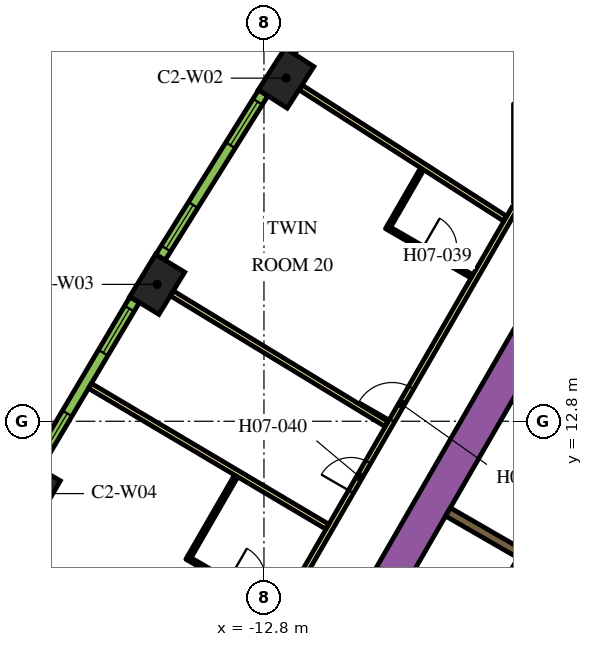
"""IFC4 building model, lengths in metres.
Left out: names, types, materials, properties, quantities, classifications, styles, units other than length and angle.
Written with IfcOpenShell. Run it as: python <this file> out.ifc"""

import sys

from ifc_helpers import new_model, si_unit, direction, frame, frame_2d, origin, origin_2d, place, context, subcontext, project, spatial, rectangle, extrude, element, fill, save


model = new_model("IFC4")
c1 = context("Model", 3, precision=1e-05, world=origin(), true_north=direction((0.0, 1.0)))
c2 = subcontext(c1, "Body", "Model", "MODEL_VIEW")
j1 = project(units=[si_unit("LENGTHUNIT", "METRE"), si_unit("PLANEANGLEUNIT", "RADIAN")], contexts=[c1])
p1 = place(None, origin())
s1 = spatial("IfcSite", under=j1, at=p1, CompositionType="ELEMENT")
p2 = place(p1, origin())
s2 = spatial("IfcBuilding", under=s1, at=p2, CompositionType="ELEMENT")
p3 = place(p2, frame((0.0, 0.0, 103.2)))
s3 = spatial("IfcBuildingStorey", under=s2, at=p3, CompositionType="ELEMENT", Elevation=103.2)
for number, where, z_axis, x_axis in (
    (1, (-12.217, 21.828, 0.0), (0.0, 0.0, 1.0), (-0.54, -0.842, 0.0)),
    (2, (-15.609, 16.402, 0.0), (0.0, 0.0, 1.0), (-0.52, -0.854, 0.0)),
    (3, (-18.874, 10.897, 0.0), (0.0, 0.0, 1.0), (-0.5, -0.866, 0.0)),
):
    element("IfcColumn", number, at=place(p3, frame(where, z_axis=z_axis, x_axis=x_axis)), inside=s3, PredefinedType="COLUMN", context=c2, shape_type="SweptSolid", body=[
        extrude(rectangle(XDim=1.3, YDim=0.9, at=origin_2d()), origin(), (0.0, 0.0, 1.0), 3.9),
    ])
p4 = place(p3, frame((-15.36, -1.503, 0.0), z_axis=(0.0, 0.0, 1.0), x_axis=(0.50000389221, 0.866023156604, 0.0)))
e4 = element("IfcWall", 4, at=p4, inside=s3, PredefinedType="SOLIDWALL", context=c2, shape_type="SweptSolid", body=[
    extrude(rectangle(XDim=21.0, YDim=0.9, at=frame_2d((10.5, 0.0))), origin(), (0.0, 0.0, 1.0), 3.9),
])
p5 = place(p3, frame((-7.959, 10.415, 0.0), z_axis=(0.0, 0.0, 1.0), x_axis=(0.866020958405, -0.500007699544, 0.0)))
e5 = element("IfcWall", 5, at=p5, inside=s3, PredefinedType="SOLIDWALL", context=c2, shape_type="SweptSolid", body=[
    extrude(rectangle(XDim=4.1, YDim=0.25, at=frame_2d((2.05, 0.0))), origin(), (0.0, 0.0, 1.0), 3.9),
])
p6 = place(p3, frame((-6.008, 9.144, 0.0), z_axis=(0.0, 0.0, 1.0), x_axis=(-0.500006956611, -0.866021387346, 0.0)))
e6 = element("IfcWall", 6, at=p6, inside=s3, PredefinedType="SOLIDWALL", context=c2, shape_type="SweptSolid", body=[
    extrude(rectangle(XDim=9.83, YDim=0.25, at=frame_2d((4.915, 0.0))), origin(), (0.0, 0.0, 1.0), 3.9),
])
p7 = place(p6, frame((6.985, 0.0, 0.0)))
e7 = element("IfcOpeningElement", 7, at=p7, cuts=e6, PredefinedType="OPENING", context=c2, shape_type="SweptSolid", body=[
    extrude(rectangle(XDim=0.9, YDim=2.1, at=frame_2d((0.45, 1.05))), frame((0.0, 0.135, 0.0), z_axis=(0.0, -1.0, 0.0), x_axis=(1.0, 0.0, 0.0)), (0.0, 0.0, 1.0), 0.27),
])
p8 = place(p3, frame((-19.081, -3.9, 0.0), z_axis=(0.0, 0.0, 1.0), x_axis=(0.499998313975, 0.866026377209, 0.0)))
e8 = element("IfcWall", 8, at=p8, inside=s3, PredefinedType="PARTITIONING", context=c2, shape_type="SweptSolid", body=[
    extrude(rectangle(XDim=25.766, YDim=0.15, at=frame_2d((12.883, 0.0))), origin(), (0.0, 0.0, 1.0), 2.75),
])
p9 = place(p8, frame((19.306, 0.0, 0.0)))
e9 = element("IfcOpeningElement", 9, at=p9, cuts=e8, PredefinedType="OPENING", context=c2, shape_type="SweptSolid", body=[
    extrude(rectangle(XDim=1.0, YDim=2.1, at=frame_2d((0.5, 1.05))), frame((0.0, 0.085, 0.0), z_axis=(0.0, -1.0, 0.0), x_axis=(1.0, 0.0, 0.0)), (0.0, 0.0, 1.0), 0.17),
])
p10 = place(p8, frame((17.144, 0.0, 0.0)))
e10 = element("IfcOpeningElement", 10, at=p10, cuts=e8, PredefinedType="OPENING", context=c2, shape_type="SweptSolid", body=[
    extrude(rectangle(XDim=0.9, YDim=2.1, at=frame_2d((0.45, 1.05))), frame((0.0, 0.085, 0.0), z_axis=(0.0, -1.0, 0.0), x_axis=(1.0, 0.0, 0.0)), (0.0, 0.0, 1.0), 0.17),
])
p11 = place(p8, frame((9.955, 0.0, 0.0)))
e11 = element("IfcOpeningElement", 11, at=p11, cuts=e8, PredefinedType="OPENING", context=c2, shape_type="SweptSolid", body=[
    extrude(rectangle(XDim=1.1, YDim=2.1, at=frame_2d((0.55, 1.05))), frame((0.0, 0.085, 0.0), z_axis=(0.0, -1.0, 0.0), x_axis=(1.0, 0.0, 0.0)), (0.0, 0.0, 1.0), 0.17),
])
p12 = place(p8, frame((8.648, 0.0, 0.0)))
e12 = element("IfcOpeningElement", 12, at=p12, cuts=e8, PredefinedType="OPENING", context=c2, shape_type="SweptSolid", body=[
    extrude(rectangle(XDim=1.0, YDim=2.1, at=frame_2d((0.5, 1.05))), frame((0.0, 0.085, 0.0), z_axis=(0.0, -1.0, 0.0), x_axis=(1.0, 0.0, 0.0)), (0.0, 0.0, 1.0), 0.17),
])
p13 = place(p8, frame((1.553, 0.0, 0.0)))
e13 = element("IfcOpeningElement", 13, at=p13, cuts=e8, PredefinedType="OPENING", context=c2, shape_type="SweptSolid", body=[
    extrude(rectangle(XDim=0.9, YDim=2.1, at=frame_2d((0.45, 1.05))), frame((0.0, 0.085, 0.0), z_axis=(0.0, -1.0, 0.0), x_axis=(1.0, 0.0, 0.0)), (0.0, 0.0, 1.0), 0.17),
])
p14 = place(p3, frame((-17.379, 13.731, 0.0), z_axis=(0.0, 0.0, 1.0), x_axis=(0.860132461691, -0.510070728768, 0.0)))
e14 = element("IfcWall", 14, at=p14, inside=s3, PredefinedType="PARTITIONING", context=c2, shape_type="SweptSolid", body=[
    extrude(rectangle(XDim=7.257, YDim=0.15, at=frame_2d((3.628, 0.0))), origin(), (0.0, 0.0, 1.0), 2.75),
])
p15 = place(p3, frame((-15.225, 16.167, 0.0), z_axis=(0.0, 0.0, 1.0), x_axis=(0.854088713274, -0.520127359266, 0.0)))
e15 = element("IfcWall", 15, at=p15, inside=s3, PredefinedType="PARTITIONING", context=c2, shape_type="SweptSolid", body=[
    extrude(rectangle(XDim=6.611, YDim=0.15, at=frame_2d((3.305, 0.0))), origin(), (0.0, 0.0, 1.0), 2.75),
])
p16 = place(p3, frame((-11.838, 21.585, 0.0), z_axis=(0.0, 0.0, 1.0), x_axis=(0.841699322813, -0.539946525108, 0.0)))
e16 = element("IfcWall", 16, at=p16, inside=s3, PredefinedType="PARTITIONING", context=c2, shape_type="SweptSolid", body=[
    extrude(rectangle(XDim=6.392, YDim=0.15, at=frame_2d((3.196, 0.0))), origin(), (0.0, 0.0, 1.0), 2.75),
])
p17 = place(p3, frame((-8.326, 26.923, 0.0), z_axis=(0.0, 0.0, 1.0), x_axis=(0.828836601893, -0.5594907393, 0.0)))
e17 = element("IfcWall", 17, at=p17, inside=s3, PredefinedType="PARTITIONING", context=c2, shape_type="SweptSolid", body=[
    extrude(rectangle(XDim=8.909, YDim=0.15, at=frame_2d((4.455, 0.0))), origin(), (0.0, 0.0, 1.0), 2.75),
])
p18 = place(p3, frame((-9.578, 17.911, 0.0), z_axis=(0.0, 0.0, 1.0), x_axis=(0.866021400173, -0.500006934395, 0.0)))
e18 = element("IfcWall", 18, at=p18, inside=s3, PredefinedType="PARTITIONING", context=c2, shape_type="SweptSolid", body=[
    extrude(rectangle(XDim=2.6, YDim=0.1, at=frame_2d((1.3, 0.0))), origin(), (0.0, 0.0, 1.0), 2.75),
])
p19 = place(p18, frame((1.1, 0.0, 0.0)))
e19 = element("IfcOpeningElement", 19, at=p19, cuts=e18, PredefinedType="OPENING", context=c2, shape_type="SweptSolid", body=[
    extrude(rectangle(XDim=0.9, YDim=2.1, at=frame_2d((0.45, 1.05))), frame((0.0, 0.06, 0.0), z_axis=(0.0, -1.0, 0.0), x_axis=(1.0, 0.0, 0.0)), (0.0, 0.0, 1.0), 0.12),
])
p20 = place(p3, frame((-9.51, 17.929, 0.0), z_axis=(0.0, 0.0, 1.0), x_axis=(0.500062521093, 0.865989304205, 0.0)))
e20 = element("IfcWall", 20, at=p20, inside=s3, PredefinedType="PARTITIONING", context=c2, shape_type="SweptSolid", body=[
    extrude(rectangle(XDim=1.74, YDim=0.1, at=frame_2d((0.87, 0.0))), origin(), (0.0, 0.0, 1.0), 2.75),
])
p21 = place(p3, frame((-14.83, 9.213, 0.0), z_axis=(0.0, 0.0, 1.0), x_axis=(0.866034573852, -0.49998411664, 0.0)))
e21 = element("IfcWall", 21, at=p21, inside=s3, PredefinedType="PARTITIONING", context=c2, shape_type="SweptSolid", body=[
    extrude(rectangle(XDim=2.8, YDim=0.1, at=frame_2d((1.4, 0.0))), origin(), (0.0, 0.0, 1.0), 2.75),
])
p22 = place(p21, frame((1.25, 0.0, 0.0)))
e22 = element("IfcOpeningElement", 22, at=p22, cuts=e21, PredefinedType="OPENING", context=c2, shape_type="SweptSolid", body=[
    extrude(rectangle(XDim=1.0, YDim=2.1, at=frame_2d((0.5, 1.05))), frame((0.0, 0.06, 0.0), z_axis=(0.0, -1.0, 0.0), x_axis=(1.0, 0.0, 0.0)), (0.0, 0.0, 1.0), 0.12),
])
p23 = place(p3, frame((-14.762, 9.231, 0.0), z_axis=(0.0, 0.0, 1.0), x_axis=(0.500003092839, 0.866023618125, 0.0)))
e23 = element("IfcWall", 23, at=p23, inside=s3, PredefinedType="PARTITIONING", context=c2, shape_type="SweptSolid", body=[
    extrude(rectangle(XDim=2.46, YDim=0.1, at=frame_2d((1.23, 0.0))), origin(), (0.0, 0.0, 1.0), 2.75),
])
p24 = place(p3, frame((-9.311, 26.799, 0.0), z_axis=(0.0, 0.0, 1.0), x_axis=(-0.549741341923, -0.835334937005, 0.0)))
e24 = element("IfcWall", 24, at=p24, inside=s3, PredefinedType="SOLIDWALL", context=c2, shape_type="SweptSolid", body=[
    extrude(rectangle(XDim=5.1, YDim=0.29, at=frame_2d((2.55, 0.0))), origin(), (0.0, 0.0, 1.0), 3.65),
])
p25 = place(p24, frame((0.273, 0.0, 0.9)))
e25 = element("IfcOpeningElement", 25, at=p25, cuts=e24, PredefinedType="OPENING", context=c2, shape_type="SweptSolid", body=[
    extrude(rectangle(XDim=1.35, YDim=2.15, at=frame_2d((0.675, 1.075))), frame((0.0, 0.155, 0.0), z_axis=(0.0, -1.0, 0.0), x_axis=(1.0, 0.0, 0.0)), (0.0, 0.0, 1.0), 0.31),
])
p26 = place(p24, frame((3.478, 0.0, 0.9)))
e26 = element("IfcOpeningElement", 26, at=p26, cuts=e24, PredefinedType="OPENING", context=c2, shape_type="SweptSolid", body=[
    extrude(rectangle(XDim=1.35, YDim=2.15, at=frame_2d((0.675, 1.075))), frame((0.0, 0.155, 0.0), z_axis=(0.0, -1.0, 0.0), x_axis=(1.0, 0.0, 0.0)), (0.0, 0.0, 1.0), 0.31),
])
p27 = place(p3, frame((-12.82, 21.439, 0.0), z_axis=(0.0, 0.0, 1.0), x_axis=(-0.530072082134, -0.847952585787, 0.0)))
e27 = element("IfcWall", 27, at=p27, inside=s3, PredefinedType="SOLIDWALL", context=c2, shape_type="SweptSolid", body=[
    extrude(rectangle(XDim=5.1, YDim=0.29, at=frame_2d((2.55, 0.0))), origin(), (0.0, 0.0, 1.0), 3.65),
])
p28 = place(p27, frame((0.273, 0.0, 0.9)))
e28 = element("IfcOpeningElement", 28, at=p28, cuts=e27, PredefinedType="OPENING", context=c2, shape_type="SweptSolid", body=[
    extrude(rectangle(XDim=1.35, YDim=2.15, at=frame_2d((0.675, 1.075))), frame((0.0, 0.155, 0.0), z_axis=(0.0, -1.0, 0.0), x_axis=(1.0, 0.0, 0.0)), (0.0, 0.0, 1.0), 0.31),
])
p29 = place(p27, frame((3.478, 0.0, 0.9)))
e29 = element("IfcOpeningElement", 29, at=p29, cuts=e27, PredefinedType="OPENING", context=c2, shape_type="SweptSolid", body=[
    extrude(rectangle(XDim=1.35, YDim=2.15, at=frame_2d((0.675, 1.075))), frame((0.0, 0.155, 0.0), z_axis=(0.0, -1.0, 0.0), x_axis=(1.0, 0.0, 0.0)), (0.0, 0.0, 1.0), 0.31),
])
p30 = place(p3, frame((-16.203, 15.998, 0.0), z_axis=(0.0, 0.0, 1.0), x_axis=(-0.510054281659, -0.860142214847, 0.0)))
e30 = element("IfcWall", 30, at=p30, inside=s3, PredefinedType="SOLIDWALL", context=c2, shape_type="SweptSolid", body=[
    extrude(rectangle(XDim=5.101, YDim=0.29, at=frame_2d((2.55, 0.0))), origin(), (0.0, 0.0, 1.0), 3.65),
])
p31 = place(p30, frame((0.273, 0.0, 0.9)))
e31 = element("IfcOpeningElement", 31, at=p31, cuts=e30, PredefinedType="OPENING", context=c2, shape_type="SweptSolid", body=[
    extrude(rectangle(XDim=1.35, YDim=2.15, at=frame_2d((0.675, 1.075))), frame((0.0, 0.155, 0.0), z_axis=(0.0, -1.0, 0.0), x_axis=(1.0, 0.0, 0.0)), (0.0, 0.0, 1.0), 0.31),
])
p32 = place(p30, frame((3.478, 0.0, 0.9)))
e32 = element("IfcOpeningElement", 32, at=p32, cuts=e30, PredefinedType="OPENING", context=c2, shape_type="SweptSolid", body=[
    extrude(rectangle(XDim=1.35, YDim=2.15, at=frame_2d((0.675, 1.075))), frame((0.0, 0.155, 0.0), z_axis=(0.0, -1.0, 0.0), x_axis=(1.0, 0.0, 0.0)), (0.0, 0.0, 1.0), 0.31),
])
p33 = place(p9, origin())
e33 = element("IfcDoor", 33, at=p33, inside=s3, OperationType="SINGLE_SWING_LEFT", PredefinedType="DOOR", context=c2, shape_type="SweptSolid", body=[
    extrude(rectangle(XDim=1.0, YDim=2.1, at=frame_2d((0.5, 1.05))), frame((0.0, 0.025, 0.0), z_axis=(0.0, -1.0, 0.0), x_axis=(1.0, 0.0, 0.0)), (0.0, 0.0, 1.0), 0.05),
])
fill(e9, e33)
p34 = place(p19, origin())
e34 = element("IfcDoor", 34, at=p34, inside=s3, OperationType="SINGLE_SWING_LEFT", PredefinedType="DOOR", context=c2, shape_type="SweptSolid", body=[
    extrude(rectangle(XDim=0.9, YDim=2.1, at=frame_2d((0.45, 1.05))), frame((0.0, 0.025, 0.0), z_axis=(0.0, -1.0, 0.0), x_axis=(1.0, 0.0, 0.0)), (0.0, 0.0, 1.0), 0.05),
])
fill(e19, e34)
p35 = place(p10, origin())
e35 = element("IfcDoor", 35, at=p35, inside=s3, OperationType="SINGLE_SWING_LEFT", PredefinedType="DOOR", context=c2, shape_type="SweptSolid", body=[
    extrude(rectangle(XDim=0.9, YDim=2.1, at=frame_2d((0.45, 1.05))), frame((0.0, 0.025, 0.0), z_axis=(0.0, -1.0, 0.0), x_axis=(1.0, 0.0, 0.0)), (0.0, 0.0, 1.0), 0.05),
])
fill(e10, e35)
p36 = place(p28, origin())
e36 = element("IfcWindow", 36, at=p36, inside=s3, PartitioningType="DOUBLE_PANEL_VERTICAL", PredefinedType="WINDOW", context=c2, shape_type="SweptSolid", body=[
    extrude(rectangle(XDim=1.35, YDim=2.15, at=frame_2d((0.675, 1.075))), frame((0.0, 0.015, 0.0), z_axis=(0.0, -1.0, 0.0), x_axis=(1.0, 0.0, 0.0)), (0.0, 0.0, 1.0), 0.06),
])
fill(e28, e36)
p37 = place(p29, origin())
e37 = element("IfcWindow", 37, at=p37, inside=s3, PartitioningType="DOUBLE_PANEL_VERTICAL", PredefinedType="WINDOW", context=c2, shape_type="SweptSolid", body=[
    extrude(rectangle(XDim=1.35, YDim=2.15, at=frame_2d((0.675, 1.075))), frame((0.0, 0.015, 0.0), z_axis=(0.0, -1.0, 0.0), x_axis=(1.0, 0.0, 0.0)), (0.0, 0.0, 1.0), 0.06),
])
fill(e29, e37)
p38 = place(p31, origin())
e38 = element("IfcWindow", 38, at=p38, inside=s3, PartitioningType="DOUBLE_PANEL_VERTICAL", PredefinedType="WINDOW", context=c2, shape_type="SweptSolid", body=[
    extrude(rectangle(XDim=1.35, YDim=2.15, at=frame_2d((0.675, 1.075))), frame((0.0, 0.015, 0.0), z_axis=(0.0, -1.0, 0.0), x_axis=(1.0, 0.0, 0.0)), (0.0, 0.0, 1.0), 0.06),
])
fill(e31, e38)
p39 = place(p32, origin())
e39 = element("IfcWindow", 39, at=p39, inside=s3, PartitioningType="DOUBLE_PANEL_VERTICAL", PredefinedType="WINDOW", context=c2, shape_type="SweptSolid", body=[
    extrude(rectangle(XDim=1.35, YDim=2.15, at=frame_2d((0.675, 1.075))), frame((0.0, 0.015, 0.0), z_axis=(0.0, -1.0, 0.0), x_axis=(1.0, 0.0, 0.0)), (0.0, 0.0, 1.0), 0.06),
])
fill(e32, e39)
save(model, sys.argv[1])
